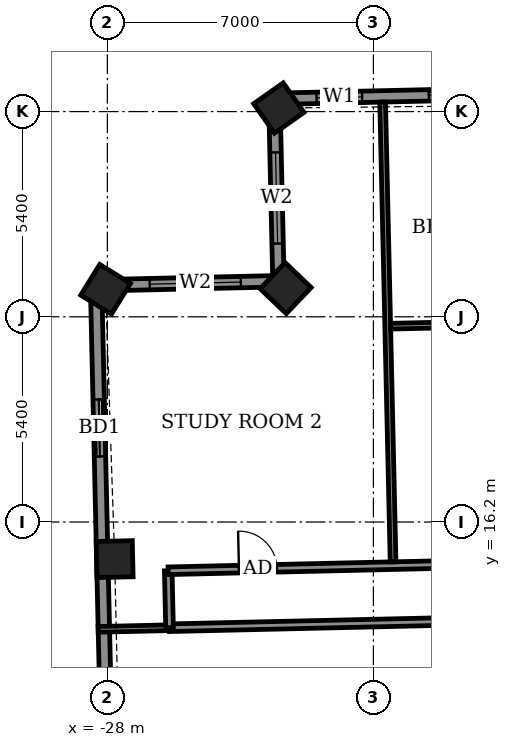
"""IFC4 building model, lengths in metres.
Left out: names, types, materials, properties, quantities, classifications, styles, units other than length and angle.
Written with IfcOpenShell. Run it as: python <this file> out.ifc"""

import sys

from ifc_helpers import new_model, si_unit, direction, frame, frame_2d, origin, origin_2d, place, context, subcontext, project, spatial, rectangle, extrude, element, fill, save


model = new_model("IFC4")
c1 = context("Model", 3, precision=1e-05, world=origin(), true_north=direction((0.0, 1.0)))
c2 = subcontext(c1, "Body", "Model", "MODEL_VIEW")
j1 = project(units=[si_unit("LENGTHUNIT", "METRE"), si_unit("PLANEANGLEUNIT", "RADIAN")], contexts=[c1])
p1 = place(None, origin())
s1 = spatial("IfcSite", under=j1, at=p1, CompositionType="ELEMENT")
p2 = place(p1, origin())
s2 = spatial("IfcBuilding", under=s1, at=p2, CompositionType="ELEMENT")
p3 = place(p2, frame((0.0, 0.0, 297.9)))
s3 = spatial("IfcBuildingStorey", under=s2, at=p3, CompositionType="ELEMENT", Elevation=297.9)
for number, where, z_axis, x_axis in (
    (1, (-23.488, 27.093, -0.55), (0.0, 0.0, 1.0), (-0.818, -0.575, 0.0)),
    (2, (-23.309, 22.355, -0.55), (0.0, 0.0, 1.0), (-0.691, -0.723, 0.0)),
    (3, (-28.046, 22.324, -0.55), (0.0, 0.0, 1.0), (-0.527, -0.85, 0.0)),
    (4, (-27.808, 15.224, -0.55), (0.0, 0.0, 1.0), (0.023, -1.0, 0.0)),
):
    element("IfcColumn", number, at=place(p3, frame(where, z_axis=z_axis, x_axis=x_axis)), inside=s3, PredefinedType="COLUMN", context=c2, shape_type="SweptSolid", body=[
        extrude(rectangle(XDim=0.95, YDim=0.95, at=origin_2d()), origin(), (0.0, 0.0, 1.0), 3.6),
    ])
p4 = place(p3, frame((26.216, 28.465, 0.0), z_axis=(0.0, 0.0, 1.0), x_axis=(-0.999742843677, -0.022677004157, 0.0)))
e5 = element("IfcWall", 5, at=p4, inside=s3, PredefinedType="SOLIDWALL", context=c2, shape_type="SweptSolid", body=[
    extrude(rectangle(XDim=49.836, YDim=0.3, at=frame_2d((24.918, 0.0))), origin(), (0.0, 0.0, 1.0), 2.5),
])
p5 = place(p4, frame((1.763, 0.0, 0.0)))
e6 = element("IfcOpeningElement", 6, at=p5, cuts=e5, PredefinedType="OPENING", context=c2, shape_type="SweptSolid", body=[
    extrude(rectangle(XDim=1.5, YDim=2.4, at=frame_2d((0.75, 1.2))), frame((0.0, 0.16, 0.0), z_axis=(0.0, -1.0, 0.0), x_axis=(1.0, 0.0, 0.0)), (0.0, 0.0, 1.0), 0.32),
])
p6 = place(p4, frame((4.912, 0.0, 0.0)))
e7 = element("IfcOpeningElement", 7, at=p6, cuts=e5, PredefinedType="OPENING", context=c2, shape_type="SweptSolid", body=[
    extrude(rectangle(XDim=1.5, YDim=2.4, at=frame_2d((0.75, 1.2))), frame((0.0, 0.16, 0.0), z_axis=(0.0, -1.0, 0.0), x_axis=(1.0, 0.0, 0.0)), (0.0, 0.0, 1.0), 0.32),
])
p7 = place(p4, frame((10.186, 0.0, 0.0)))
e8 = element("IfcOpeningElement", 8, at=p7, cuts=e5, PredefinedType="OPENING", context=c2, shape_type="SweptSolid", body=[
    extrude(rectangle(XDim=1.5, YDim=2.4, at=frame_2d((0.75, 1.2))), frame((0.0, 0.16, 0.0), z_axis=(0.0, -1.0, 0.0), x_axis=(1.0, 0.0, 0.0)), (0.0, 0.0, 1.0), 0.32),
])
p8 = place(p4, frame((15.093, 0.0, 0.0)))
e9 = element("IfcOpeningElement", 9, at=p8, cuts=e5, PredefinedType="OPENING", context=c2, shape_type="SweptSolid", body=[
    extrude(rectangle(XDim=1.5, YDim=2.4, at=frame_2d((0.75, 1.2))), frame((0.0, 0.16, 0.0), z_axis=(0.0, -1.0, 0.0), x_axis=(1.0, 0.0, 0.0)), (0.0, 0.0, 1.0), 0.32),
])
p9 = place(p4, frame((18.449, 0.0, 0.0)))
e10 = element("IfcOpeningElement", 10, at=p9, cuts=e5, PredefinedType="OPENING", context=c2, shape_type="SweptSolid", body=[
    extrude(rectangle(XDim=1.5, YDim=2.4, at=frame_2d((0.75, 1.2))), frame((0.0, 0.16, 0.0), z_axis=(0.0, -1.0, 0.0), x_axis=(1.0, 0.0, 0.0)), (0.0, 0.0, 1.0), 0.32),
])
p10 = place(p4, frame((22.924, 0.0, 0.0)))
e11 = element("IfcOpeningElement", 11, at=p10, cuts=e5, PredefinedType="OPENING", context=c2, shape_type="SweptSolid", body=[
    extrude(rectangle(XDim=1.5, YDim=2.4, at=frame_2d((0.75, 1.2))), frame((0.0, 0.16, 0.0), z_axis=(0.0, -1.0, 0.0), x_axis=(1.0, 0.0, 0.0)), (0.0, 0.0, 1.0), 0.32),
])
p11 = place(p4, frame((26.28, 0.0, 0.0)))
e12 = element("IfcOpeningElement", 12, at=p11, cuts=e5, PredefinedType="OPENING", context=c2, shape_type="SweptSolid", body=[
    extrude(rectangle(XDim=1.5, YDim=2.4, at=frame_2d((0.75, 1.2))), frame((0.0, 0.16, 0.0), z_axis=(0.0, -1.0, 0.0), x_axis=(1.0, 0.0, 0.0)), (0.0, 0.0, 1.0), 0.32),
])
p12 = place(p4, frame((31.361, 0.0, 0.0)))
e13 = element("IfcOpeningElement", 13, at=p12, cuts=e5, PredefinedType="OPENING", context=c2, shape_type="SweptSolid", body=[
    extrude(rectangle(XDim=1.5, YDim=2.4, at=frame_2d((0.75, 1.2))), frame((0.0, 0.16, 0.0), z_axis=(0.0, -1.0, 0.0), x_axis=(1.0, 0.0, 0.0)), (0.0, 0.0, 1.0), 0.32),
])
p13 = place(p4, frame((36.437, 0.0, 0.0)))
e14 = element("IfcOpeningElement", 14, at=p13, cuts=e5, PredefinedType="OPENING", context=c2, shape_type="SweptSolid", body=[
    extrude(rectangle(XDim=1.5, YDim=2.4, at=frame_2d((0.75, 1.2))), frame((0.0, 0.16, 0.0), z_axis=(0.0, -1.0, 0.0), x_axis=(1.0, 0.0, 0.0)), (0.0, 0.0, 1.0), 0.32),
])
p14 = place(p4, frame((39.793, 0.0, 0.0)))
e15 = element("IfcOpeningElement", 15, at=p14, cuts=e5, PredefinedType="OPENING", context=c2, shape_type="SweptSolid", body=[
    extrude(rectangle(XDim=1.5, YDim=2.4, at=frame_2d((0.75, 1.2))), frame((0.0, 0.16, 0.0), z_axis=(0.0, -1.0, 0.0), x_axis=(1.0, 0.0, 0.0)), (0.0, 0.0, 1.0), 0.32),
])
p15 = place(p4, frame((44.267, 0.0, 0.0)))
e16 = element("IfcOpeningElement", 16, at=p15, cuts=e5, PredefinedType="OPENING", context=c2, shape_type="SweptSolid", body=[
    extrude(rectangle(XDim=1.5, YDim=2.4, at=frame_2d((0.75, 1.2))), frame((0.0, 0.16, 0.0), z_axis=(0.0, -1.0, 0.0), x_axis=(1.0, 0.0, 0.0)), (0.0, 0.0, 1.0), 0.32),
])
p16 = place(p4, frame((47.524, 0.0, 0.9)))
e17 = element("IfcOpeningElement", 17, at=p16, cuts=e5, PredefinedType="OPENING", context=c2, shape_type="SweptSolid", body=[
    extrude(rectangle(XDim=1.2, YDim=1.5, at=frame_2d((0.6, 0.75))), frame((0.0, 0.16, 0.0), z_axis=(0.0, -1.0, 0.0), x_axis=(1.0, 0.0, 0.0)), (0.0, 0.0, 1.0), 0.32),
])
p17 = place(p3, frame((-23.607, 27.335, 0.0), z_axis=(0.0, 0.0, 1.0), x_axis=(0.022631497725, -0.999743874855, 0.0)))
e18 = element("IfcWall", 18, at=p17, inside=s3, PredefinedType="SOLIDWALL", context=c2, shape_type="SweptSolid", body=[
    extrude(rectangle(XDim=4.811, YDim=0.3, at=frame_2d((2.406, 0.0))), origin(), (0.0, 0.0, 1.0), 2.55),
])
p18 = place(p17, frame((1.409, 0.0, 0.9)))
e19 = element("IfcOpeningElement", 19, at=p18, cuts=e18, PredefinedType="OPENING", context=c2, shape_type="SweptSolid", body=[
    extrude(rectangle(XDim=2.4, YDim=1.5, at=frame_2d((1.2, 0.75))), frame((0.0, 0.16, 0.0), z_axis=(0.0, -1.0, 0.0), x_axis=(1.0, 0.0, 0.0)), (0.0, 0.0, 1.0), 0.32),
])
p19 = place(p3, frame((-23.498, 22.536, 0.0), z_axis=(0.0, 0.0, 1.0), x_axis=(-0.999742701292, -0.022683280499, 0.0)))
e20 = element("IfcWall", 20, at=p19, inside=s3, PredefinedType="SOLIDWALL", context=c2, shape_type="SweptSolid", body=[
    extrude(rectangle(XDim=4.8, YDim=0.3, at=frame_2d((2.4, 0.0))), origin(), (0.0, 0.0, 1.0), 2.55),
])
p20 = place(p19, frame((0.99, 0.0, 0.9)))
e21 = element("IfcOpeningElement", 21, at=p20, cuts=e20, PredefinedType="OPENING", context=c2, shape_type="SweptSolid", body=[
    extrude(rectangle(XDim=2.4, YDim=1.5, at=frame_2d((1.2, 0.75))), frame((0.0, 0.16, 0.0), z_axis=(0.0, -1.0, 0.0), x_axis=(1.0, 0.0, 0.0)), (0.0, 0.0, 1.0), 0.32),
])
p21 = place(p3, frame((-28.297, 22.427, 0.0), z_axis=(0.0, 0.0, 1.0), x_axis=(0.02269714286, -0.999742386671, 0.0)))
e22 = element("IfcWall", 22, at=p21, inside=s3, PredefinedType="SOLIDWALL", context=c2, shape_type="SweptSolid", body=[
    extrude(rectangle(XDim=14.629, YDim=0.3, at=frame_2d((7.314, 0.0))), origin(), (0.0, 0.0, 1.0), 2.5),
])
p22 = place(p21, frame((3.002, 0.0, 0.0)))
e23 = element("IfcOpeningElement", 23, at=p22, cuts=e22, PredefinedType="OPENING", context=c2, shape_type="SweptSolid", body=[
    extrude(rectangle(XDim=1.5, YDim=2.4, at=frame_2d((0.75, 1.2))), frame((0.0, 0.16, 0.0), z_axis=(0.0, -1.0, 0.0), x_axis=(1.0, 0.0, 0.0)), (0.0, 0.0, 1.0), 0.32),
])
p23 = place(p21, frame((10.475, 0.0, 0.9)))
e24 = element("IfcOpeningElement", 24, at=p23, cuts=e22, PredefinedType="OPENING", context=c2, shape_type="SweptSolid", body=[
    extrude(rectangle(XDim=2.4, YDim=1.5, at=frame_2d((1.2, 0.75))), frame((0.0, 0.16, 0.0), z_axis=(0.0, -1.0, 0.0), x_axis=(1.0, 0.0, 0.0)), (0.0, 0.0, 1.0), 0.32),
])
p24 = place(p3, frame((-28.242, 13.376, 0.0), z_axis=(0.0, 0.0, 1.0), x_axis=(0.999738606422, 0.022863045053, 0.0)))
e25 = element("IfcWall", 25, at=p24, inside=s3, PredefinedType="PARTITIONING", context=c2, shape_type="SweptSolid", body=[
    extrude(rectangle(XDim=1.879, YDim=0.15, at=frame_2d((0.94, 0.0))), origin(), (0.0, 0.0, 1.0), 2.5),
])
p25 = place(p3, frame((-26.367, 13.419, 0.0), z_axis=(0.0, 0.0, 1.0), x_axis=(0.999742888587, 0.022675024131, 0.0)))
e26 = element("IfcWall", 26, at=p25, inside=s3, PredefinedType="PARTITIONING", context=c2, shape_type="SweptSolid", body=[
    extrude(rectangle(XDim=9.087, YDim=0.2, at=frame_2d((4.544, 0.0))), origin(), (0.0, 0.0, 1.0), 3.05),
])
p26 = place(p3, frame((-26.364, 13.419, 0.0), z_axis=(0.0, 0.0, 1.0), x_axis=(-0.022632637625, 0.99974384905, 0.0)))
e27 = element("IfcWall", 27, at=p26, inside=s3, PredefinedType="PARTITIONING", context=c2, shape_type="SweptSolid", body=[
    extrude(rectangle(XDim=1.5, YDim=0.2, at=frame_2d((0.75, 0.0))), origin(), (0.0, 0.0, 1.0), 3.05),
])
p27 = place(p3, frame((-26.401, 14.918, 0.0), z_axis=(0.0, 0.0, 1.0), x_axis=(0.99974239733, 0.022696673341, 0.0)))
e28 = element("IfcWall", 28, at=p27, inside=s3, PredefinedType="PARTITIONING", context=c2, shape_type="SweptSolid", body=[
    extrude(rectangle(XDim=55.386, YDim=0.2, at=frame_2d((27.693, 0.0))), origin(), (0.0, 0.0, 1.0), 3.05),
])
p28 = place(p27, frame((53.718, 0.0, 0.0)))
e29 = element("IfcOpeningElement", 29, at=p28, cuts=e28, PredefinedType="OPENING", context=c2, shape_type="SweptSolid", body=[
    extrude(rectangle(XDim=1.0, YDim=2.1, at=frame_2d((0.5, 1.05))), frame((0.0, 0.11, 0.0), z_axis=(0.0, -1.0, 0.0), x_axis=(1.0, 0.0, 0.0)), (0.0, 0.0, 1.0), 0.22),
])
p29 = place(p27, frame((49.325, 0.0, 0.0)))
e30 = element("IfcOpeningElement", 30, at=p29, cuts=e28, PredefinedType="OPENING", context=c2, shape_type="SweptSolid", body=[
    extrude(rectangle(XDim=0.9, YDim=2.1, at=frame_2d((0.45, 1.05))), frame((0.0, 0.11, 0.0), z_axis=(0.0, -1.0, 0.0), x_axis=(1.0, 0.0, 0.0)), (0.0, 0.0, 1.0), 0.22),
])
p30 = place(p27, frame((44.575, 0.0, 0.0)))
e31 = element("IfcOpeningElement", 31, at=p30, cuts=e28, PredefinedType="OPENING", context=c2, shape_type="SweptSolid", body=[
    extrude(rectangle(XDim=0.9, YDim=2.1, at=frame_2d((0.45, 1.05))), frame((0.0, 0.11, 0.0), z_axis=(0.0, -1.0, 0.0), x_axis=(1.0, 0.0, 0.0)), (0.0, 0.0, 1.0), 0.22),
])
p31 = place(p27, frame((42.725, 0.0, 0.0)))
e32 = element("IfcOpeningElement", 32, at=p31, cuts=e28, PredefinedType="OPENING", context=c2, shape_type="SweptSolid", body=[
    extrude(rectangle(XDim=0.9, YDim=2.1, at=frame_2d((0.45, 1.05))), frame((0.0, 0.11, 0.0), z_axis=(0.0, -1.0, 0.0), x_axis=(1.0, 0.0, 0.0)), (0.0, 0.0, 1.0), 0.22),
])
p32 = place(p27, frame((36.1, 0.0, 0.0)))
e33 = element("IfcOpeningElement", 33, at=p32, cuts=e28, PredefinedType="OPENING", context=c2, shape_type="SweptSolid", body=[
    extrude(rectangle(XDim=0.9, YDim=2.1, at=frame_2d((0.45, 1.05))), frame((0.0, 0.11, 0.0), z_axis=(0.0, -1.0, 0.0), x_axis=(1.0, 0.0, 0.0)), (0.0, 0.0, 1.0), 0.22),
])
p33 = place(p27, frame((34.25, 0.0, 0.0)))
e34 = element("IfcOpeningElement", 34, at=p33, cuts=e28, PredefinedType="OPENING", context=c2, shape_type="SweptSolid", body=[
    extrude(rectangle(XDim=0.9, YDim=2.1, at=frame_2d((0.45, 1.05))), frame((0.0, 0.11, 0.0), z_axis=(0.0, -1.0, 0.0), x_axis=(1.0, 0.0, 0.0)), (0.0, 0.0, 1.0), 0.22),
])
p34 = place(p27, frame((27.6, 0.0, 0.0)))
e35 = element("IfcOpeningElement", 35, at=p34, cuts=e28, PredefinedType="OPENING", context=c2, shape_type="SweptSolid", body=[
    extrude(rectangle(XDim=0.9, YDim=2.1, at=frame_2d((0.45, 1.05))), frame((0.0, 0.11, 0.0), z_axis=(0.0, -1.0, 0.0), x_axis=(1.0, 0.0, 0.0)), (0.0, 0.0, 1.0), 0.22),
])
p35 = place(p27, frame((25.775, 0.0, 0.0)))
e36 = element("IfcOpeningElement", 36, at=p35, cuts=e28, PredefinedType="OPENING", context=c2, shape_type="SweptSolid", body=[
    extrude(rectangle(XDim=0.9, YDim=2.1, at=frame_2d((0.45, 1.05))), frame((0.0, 0.11, 0.0), z_axis=(0.0, -1.0, 0.0), x_axis=(1.0, 0.0, 0.0)), (0.0, 0.0, 1.0), 0.22),
])
p36 = place(p27, frame((19.15, 0.0, 0.0)))
e37 = element("IfcOpeningElement", 37, at=p36, cuts=e28, PredefinedType="OPENING", context=c2, shape_type="SweptSolid", body=[
    extrude(rectangle(XDim=0.9, YDim=2.1, at=frame_2d((0.45, 1.05))), frame((0.0, 0.11, 0.0), z_axis=(0.0, -1.0, 0.0), x_axis=(1.0, 0.0, 0.0)), (0.0, 0.0, 1.0), 0.22),
])
p37 = place(p27, frame((17.3, 0.0, 0.0)))
e38 = element("IfcOpeningElement", 38, at=p37, cuts=e28, PredefinedType="OPENING", context=c2, shape_type="SweptSolid", body=[
    extrude(rectangle(XDim=0.9, YDim=2.1, at=frame_2d((0.45, 1.05))), frame((0.0, 0.11, 0.0), z_axis=(0.0, -1.0, 0.0), x_axis=(1.0, 0.0, 0.0)), (0.0, 0.0, 1.0), 0.22),
])
p38 = place(p27, frame((10.65, 0.0, 0.0)))
e39 = element("IfcOpeningElement", 39, at=p38, cuts=e28, PredefinedType="OPENING", context=c2, shape_type="SweptSolid", body=[
    extrude(rectangle(XDim=0.9, YDim=2.1, at=frame_2d((0.45, 1.05))), frame((0.0, 0.11, 0.0), z_axis=(0.0, -1.0, 0.0), x_axis=(1.0, 0.0, 0.0)), (0.0, 0.0, 1.0), 0.22),
])
p39 = place(p27, frame((8.8, 0.0, 0.0)))
e40 = element("IfcOpeningElement", 40, at=p39, cuts=e28, PredefinedType="OPENING", context=c2, shape_type="SweptSolid", body=[
    extrude(rectangle(XDim=0.9, YDim=2.1, at=frame_2d((0.45, 1.05))), frame((0.0, 0.11, 0.0), z_axis=(0.0, -1.0, 0.0), x_axis=(1.0, 0.0, 0.0)), (0.0, 0.0, 1.0), 0.22),
])
p40 = place(p27, frame((1.864, 0.0, 0.0)))
e41 = element("IfcOpeningElement", 41, at=p40, cuts=e28, PredefinedType="OPENING", context=c2, shape_type="SweptSolid", body=[
    extrude(rectangle(XDim=1.0, YDim=2.1, at=frame_2d((0.5, 1.05))), frame((0.0, 0.11, 0.0), z_axis=(0.0, -1.0, 0.0), x_axis=(1.0, 0.0, 0.0)), (0.0, 0.0, 1.0), 0.22),
])
p41 = place(p3, frame((-20.482, 15.152, 0.0), z_axis=(0.0, 0.0, 1.0), x_axis=(-0.022737445516, 0.999741470867, 0.0)))
e42 = element("IfcWall", 42, at=p41, inside=s3, PredefinedType="PARTITIONING", context=c2, shape_type="SweptSolid", body=[
    extrude(rectangle(XDim=12.101, YDim=0.15, at=frame_2d((6.051, 0.0))), origin(), (0.0, 0.0, 1.0), 2.55),
])
p42 = place(p3, frame((-20.546, 21.353, 0.0), z_axis=(0.0, 0.0, 1.0), x_axis=(0.999749954681, 0.022361308448, 0.0)))
e43 = element("IfcWall", 43, at=p42, inside=s3, PredefinedType="PARTITIONING", context=c2, shape_type="SweptSolid", body=[
    extrude(rectangle(XDim=2.325, YDim=0.15, at=frame_2d((1.163, 0.0))), origin(), (0.0, 0.0, 1.0), 3.05),
])
p43 = place(p15, origin())
e44 = element("IfcDoor", 44, at=p43, inside=s3, OperationType="SLIDING_TO_LEFT", PredefinedType="DOOR", context=c2, shape_type="SweptSolid", body=[
    extrude(rectangle(XDim=1.5, YDim=2.4, at=frame_2d((0.75, 1.2))), frame((0.0, 0.025, 0.0), z_axis=(0.0, -1.0, 0.0), x_axis=(1.0, 0.0, 0.0)), (0.0, 0.0, 1.0), 0.05),
])
fill(e16, e44)
p44 = place(p16, origin())
e45 = element("IfcWindow", 45, at=p44, inside=s3, PartitioningType="SINGLE_PANEL", PredefinedType="WINDOW", context=c2, shape_type="SweptSolid", body=[
    extrude(rectangle(XDim=1.2, YDim=1.5, at=frame_2d((0.6, 0.75))), frame((0.0, 0.03, 0.0), z_axis=(0.0, -1.0, 0.0), x_axis=(1.0, 0.0, 0.0)), (0.0, 0.0, 1.0), 0.06),
])
fill(e17, e45)
p45 = place(p18, origin())
e46 = element("IfcWindow", 46, at=p45, inside=s3, PartitioningType="DOUBLE_PANEL_VERTICAL", PredefinedType="WINDOW", context=c2, shape_type="SweptSolid", body=[
    extrude(rectangle(XDim=2.4, YDim=1.5, at=frame_2d((1.2, 0.75))), frame((0.0, 0.03, 0.0), z_axis=(0.0, -1.0, 0.0), x_axis=(1.0, 0.0, 0.0)), (0.0, 0.0, 1.0), 0.06),
])
fill(e19, e46)
p46 = place(p20, origin())
e47 = element("IfcWindow", 47, at=p46, inside=s3, PartitioningType="DOUBLE_PANEL_VERTICAL", PredefinedType="WINDOW", context=c2, shape_type="SweptSolid", body=[
    extrude(rectangle(XDim=2.4, YDim=1.5, at=frame_2d((1.2, 0.75))), frame((0.0, 0.03, 0.0), z_axis=(0.0, -1.0, 0.0), x_axis=(1.0, 0.0, 0.0)), (0.0, 0.0, 1.0), 0.06),
])
fill(e21, e47)
p47 = place(p22, origin())
e48 = element("IfcDoor", 48, at=p47, inside=s3, OperationType="SLIDING_TO_LEFT", PredefinedType="DOOR", context=c2, shape_type="SweptSolid", body=[
    extrude(rectangle(XDim=1.5, YDim=2.4, at=frame_2d((0.75, 1.2))), frame((0.0, 0.025, 0.0), z_axis=(0.0, -1.0, 0.0), x_axis=(1.0, 0.0, 0.0)), (0.0, 0.0, 1.0), 0.05),
])
fill(e23, e48)
p48 = place(p40, origin())
e49 = element("IfcDoor", 49, at=p48, inside=s3, OperationType="SINGLE_SWING_RIGHT", PredefinedType="DOOR", context=c2, shape_type="SweptSolid", body=[
    extrude(rectangle(XDim=1.0, YDim=2.1, at=frame_2d((0.5, 1.05))), frame((0.0, 0.025, 0.0), z_axis=(0.0, -1.0, 0.0), x_axis=(1.0, 0.0, 0.0)), (0.0, 0.0, 1.0), 0.05),
])
fill(e41, e49)
save(model, sys.argv[1])
